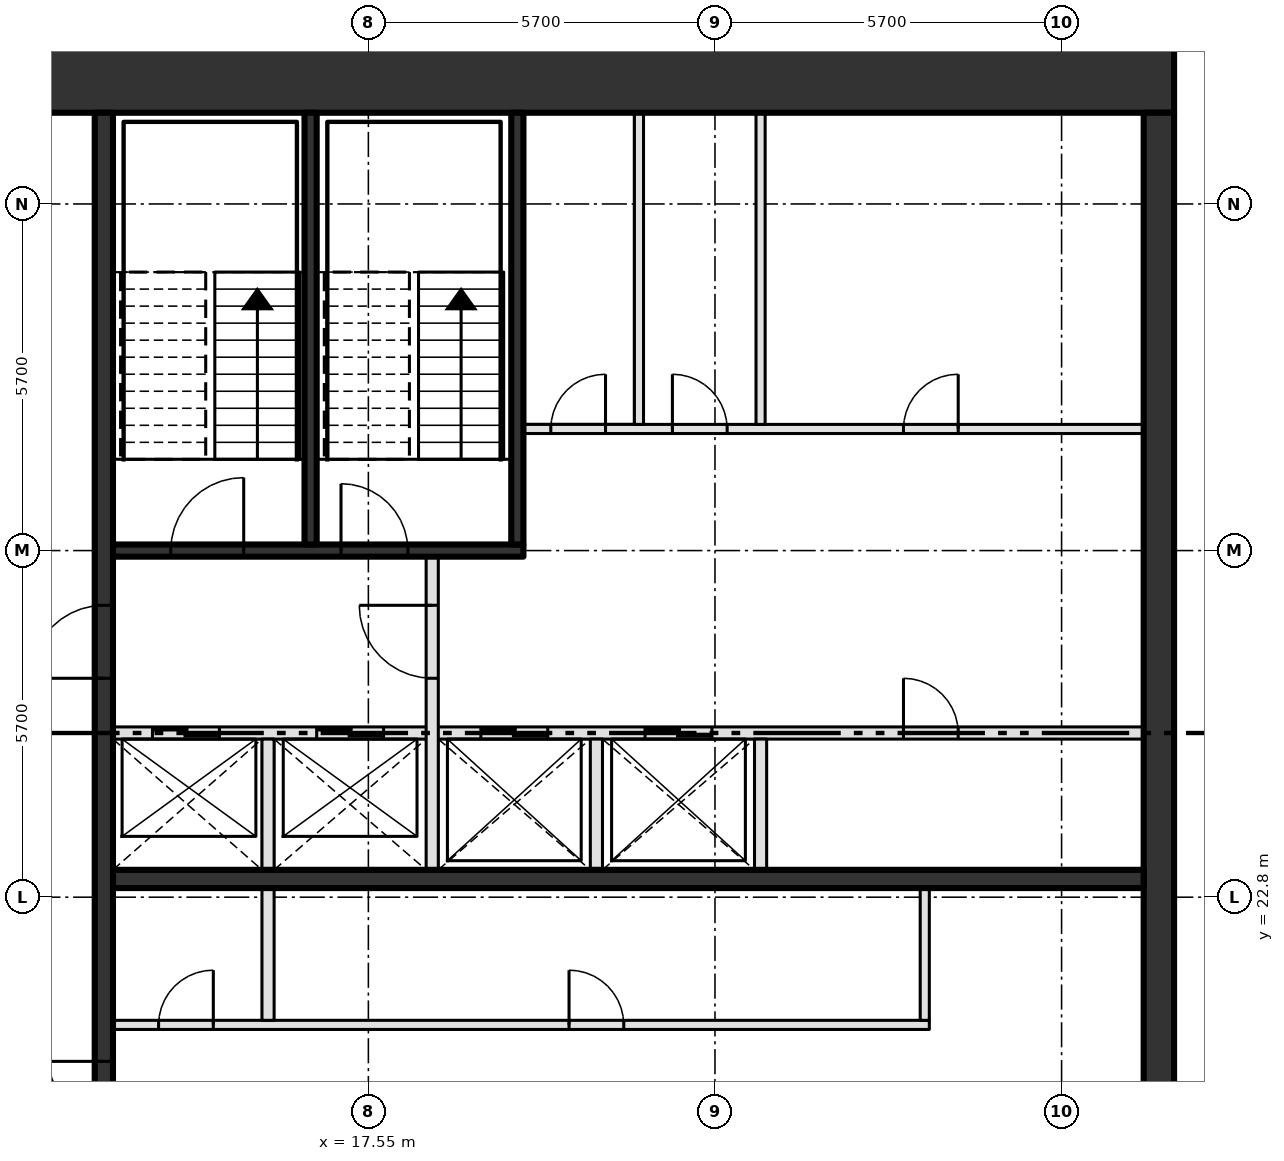
"""IFC4 building model, lengths in metres.
Left out: names, types, materials, properties, quantities, classifications, styles, units other than length and angle.
Written with IfcOpenShell. Run it as: python <this file> out.ifc"""

import sys

from ifc_helpers import new_model, si_unit, direction, frame, frame_2d, origin, place, context, subcontext, project, spatial, rectangle, extrude, element, fill, save


model = new_model("IFC4")
c1 = context("Model", 3, precision=1e-05, world=origin(), true_north=direction((0.0, 1.0)))
c2 = subcontext(c1, "Body", "Model", "MODEL_VIEW")
j1 = project(units=[si_unit("LENGTHUNIT", "METRE"), si_unit("PLANEANGLEUNIT", "RADIAN")], contexts=[c1])
p1 = place(None, origin())
s1 = spatial("IfcSite", under=j1, at=p1, CompositionType="ELEMENT")
p2 = place(p1, origin())
s2 = spatial("IfcBuilding", under=s1, at=p2, CompositionType="ELEMENT")
p3 = place(p2, frame((0.0, 0.0, 354.0)))
s3 = spatial("IfcBuildingStorey", under=s2, at=p3, CompositionType="ELEMENT", Elevation=354.0)
p4 = place(p3, frame((8.0, 36.3, -0.3), z_axis=(0.0, 0.0, 1.0), x_axis=(1.0, 0.0, 0.0)))
e1 = element("IfcWall", 1, at=p4, inside=s3, PredefinedType="SHEAR", context=c2, shape_type="SweptSolid", body=[
    extrude(rectangle(XDim=22.8, YDim=1.2, at=frame_2d((11.4, 0.0))), origin(), (0.0, 0.0, 1.0), 4.2),
])
p5 = place(p4, frame((2.3, 0.0, 0.3)))
e2 = element("IfcOpeningElement", 2, at=p5, cuts=e1, PredefinedType="OPENING", context=c2, shape_type="SweptSolid", body=[
    extrude(rectangle(XDim=1.8, YDim=2.1, at=frame_2d((0.9, 1.05))), frame((0.0, 0.61, 0.0), z_axis=(0.0, -1.0, 0.0), x_axis=(1.0, 0.0, 0.0)), (0.0, 0.0, 1.0), 1.22),
])
p6 = place(p3, frame((30.55, 14.6, -0.3), z_axis=(0.0, 0.0, 1.0), x_axis=(0.0, 1.0, 0.0)))
e3 = element("IfcWall", 3, at=p6, inside=s3, PredefinedType="SHEAR", context=c2, shape_type="SweptSolid", body=[
    extrude(rectangle(XDim=21.1, YDim=0.5, at=frame_2d((10.55, 0.0))), origin(), (0.0, 0.0, 1.0), 4.2),
])
p7 = place(p3, frame((13.35, 20.7, 0.0), z_axis=(0.0, 0.0, 1.0), x_axis=(1.0, 0.0, 0.0)))
e4 = element("IfcWall", 4, at=p7, inside=s3, PredefinedType="PARTITIONING", context=c2, shape_type="SweptSolid", body=[
    extrude(rectangle(XDim=13.425, YDim=0.15, at=frame_2d((6.712, 0.0))), origin(), (0.0, 0.0, 1.0), 3.9),
])
p8 = place(p7, frame((0.75, 0.0, 0.0)))
e5 = element("IfcOpeningElement", 5, at=p8, cuts=e4, PredefinedType="OPENING", context=c2, shape_type="SweptSolid", body=[
    extrude(rectangle(XDim=0.9, YDim=2.1, at=frame_2d((0.45, 1.05))), frame((0.0, 0.085, 0.0), z_axis=(0.0, -1.0, 0.0), x_axis=(1.0, 0.0, 0.0)), (0.0, 0.0, 1.0), 0.17),
])
p9 = place(p7, frame((7.5, 0.0, 0.0)))
e6 = element("IfcOpeningElement", 6, at=p9, cuts=e4, PredefinedType="OPENING", context=c2, shape_type="SweptSolid", body=[
    extrude(rectangle(XDim=0.9, YDim=2.1, at=frame_2d((0.45, 1.05))), frame((0.0, 0.085, 0.0), z_axis=(0.0, -1.0, 0.0), x_axis=(1.0, 0.0, 0.0)), (0.0, 0.0, 1.0), 0.17),
])
p10 = place(p3, frame((13.35, 23.1, 0.0), z_axis=(0.0, 0.0, 1.0), x_axis=(1.0, 0.0, 0.0)))
e7 = element("IfcWall", 7, at=p10, inside=s3, PredefinedType="SHEAR", context=c2, shape_type="SweptSolid", body=[
    extrude(rectangle(XDim=16.95, YDim=0.3, at=frame_2d((8.475, 0.0))), origin(), (0.0, 0.0, 1.0), 3.9),
])
p11 = place(p3, frame((13.35, 25.5, 0.0), z_axis=(0.0, 0.0, 1.0), x_axis=(1.0, 0.0, 0.0)))
e8 = element("IfcWall", 8, at=p11, inside=s3, PredefinedType="SOLIDWALL", context=c2, shape_type="SweptSolid", body=[
    extrude(rectangle(XDim=16.95, YDim=0.2, at=frame_2d((8.475, 0.0))), origin(), (0.0, 0.0, 1.0), 3.9),
])
p12 = place(p11, frame((0.65, 0.0, 0.0)))
e9 = element("IfcOpeningElement", 9, at=p12, cuts=e8, PredefinedType="OPENING", context=c2, shape_type="SweptSolid", body=[
    extrude(rectangle(XDim=1.1, YDim=2.1, at=frame_2d((0.55, 1.05))), frame((0.0, 0.11, 0.0), z_axis=(0.0, -1.0, 0.0), x_axis=(1.0, 0.0, 0.0)), (0.0, 0.0, 1.0), 0.22),
])
p13 = place(p11, frame((3.35, 0.0, 0.0)))
e10 = element("IfcOpeningElement", 10, at=p13, cuts=e8, PredefinedType="OPENING", context=c2, shape_type="SweptSolid", body=[
    extrude(rectangle(XDim=1.1, YDim=2.1, at=frame_2d((0.55, 1.05))), frame((0.0, 0.11, 0.0), z_axis=(0.0, -1.0, 0.0), x_axis=(1.0, 0.0, 0.0)), (0.0, 0.0, 1.0), 0.22),
])
p14 = place(p11, frame((6.05, 0.0, 0.0)))
e11 = element("IfcOpeningElement", 11, at=p14, cuts=e8, PredefinedType="OPENING", context=c2, shape_type="SweptSolid", body=[
    extrude(rectangle(XDim=1.1, YDim=2.1, at=frame_2d((0.55, 1.05))), frame((0.0, 0.11, 0.0), z_axis=(0.0, -1.0, 0.0), x_axis=(1.0, 0.0, 0.0)), (0.0, 0.0, 1.0), 0.22),
])
p15 = place(p11, frame((8.75, 0.0, 0.0)))
e12 = element("IfcOpeningElement", 12, at=p15, cuts=e8, PredefinedType="OPENING", context=c2, shape_type="SweptSolid", body=[
    extrude(rectangle(XDim=1.1, YDim=2.1, at=frame_2d((0.55, 1.05))), frame((0.0, 0.11, 0.0), z_axis=(0.0, -1.0, 0.0), x_axis=(1.0, 0.0, 0.0)), (0.0, 0.0, 1.0), 0.22),
])
p16 = place(p11, frame((13.0, 0.0, 0.0)))
e13 = element("IfcOpeningElement", 13, at=p16, cuts=e8, PredefinedType="OPENING", context=c2, shape_type="SweptSolid", body=[
    extrude(rectangle(XDim=0.9, YDim=2.1, at=frame_2d((0.45, 1.05))), frame((0.0, 0.11, 0.0), z_axis=(0.0, -1.0, 0.0), x_axis=(1.0, 0.0, 0.0)), (0.0, 0.0, 1.0), 0.22),
])
p17 = place(p3, frame((13.35, 28.5, 0.0), z_axis=(0.0, 0.0, 1.0), x_axis=(1.0, 0.0, 0.0)))
e14 = element("IfcWall", 14, at=p17, inside=s3, PredefinedType="SOLIDWALL", context=c2, shape_type="SweptSolid", body=[
    extrude(rectangle(XDim=6.75, YDim=0.2, at=frame_2d((3.375, 0.0))), origin(), (0.0, 0.0, 1.0), 3.9),
])
p18 = place(p17, frame((0.95, 0.0, 0.0)))
e15 = element("IfcOpeningElement", 15, at=p18, cuts=e14, PredefinedType="OPENING", context=c2, shape_type="SweptSolid", body=[
    extrude(rectangle(XDim=1.2, YDim=2.1, at=frame_2d((0.6, 1.05))), frame((0.0, 0.11, 0.0), z_axis=(0.0, -1.0, 0.0), x_axis=(1.0, 0.0, 0.0)), (0.0, 0.0, 1.0), 0.22),
])
p19 = place(p17, frame((3.75, 0.0, 0.0)))
e16 = element("IfcOpeningElement", 16, at=p19, cuts=e14, PredefinedType="OPENING", context=c2, shape_type="SweptSolid", body=[
    extrude(rectangle(XDim=1.1, YDim=2.1, at=frame_2d((0.55, 1.05))), frame((0.0, 0.11, 0.0), z_axis=(0.0, -1.0, 0.0), x_axis=(1.0, 0.0, 0.0)), (0.0, 0.0, 1.0), 0.22),
])
p20 = place(p3, frame((20.1, 30.5, 0.0), z_axis=(0.0, 0.0, 1.0), x_axis=(1.0, 0.0, 0.0)))
e17 = element("IfcWall", 17, at=p20, inside=s3, PredefinedType="PARTITIONING", context=c2, shape_type="SweptSolid", body=[
    extrude(rectangle(XDim=10.2, YDim=0.15, at=frame_2d((5.1, 0.0))), origin(), (0.0, 0.0, 1.0), 3.9),
])
p21 = place(p20, frame((0.45, 0.0, 0.0)))
e18 = element("IfcOpeningElement", 18, at=p21, cuts=e17, PredefinedType="OPENING", context=c2, shape_type="SweptSolid", body=[
    extrude(rectangle(XDim=0.9, YDim=2.1, at=frame_2d((0.45, 1.05))), frame((0.0, 0.085, 0.0), z_axis=(0.0, -1.0, 0.0), x_axis=(1.0, 0.0, 0.0)), (0.0, 0.0, 1.0), 0.17),
])
p22 = place(p20, frame((2.45, 0.0, 0.0)))
e19 = element("IfcOpeningElement", 19, at=p22, cuts=e17, PredefinedType="OPENING", context=c2, shape_type="SweptSolid", body=[
    extrude(rectangle(XDim=0.9, YDim=2.1, at=frame_2d((0.45, 1.05))), frame((0.0, 0.085, 0.0), z_axis=(0.0, -1.0, 0.0), x_axis=(1.0, 0.0, 0.0)), (0.0, 0.0, 1.0), 0.17),
])
p23 = place(p20, frame((6.25, 0.0, 0.0)))
e20 = element("IfcOpeningElement", 20, at=p23, cuts=e17, PredefinedType="OPENING", context=c2, shape_type="SweptSolid", body=[
    extrude(rectangle(XDim=0.9, YDim=2.1, at=frame_2d((0.45, 1.05))), frame((0.0, 0.085, 0.0), z_axis=(0.0, -1.0, 0.0), x_axis=(1.0, 0.0, 0.0)), (0.0, 0.0, 1.0), 0.17),
])
p24 = place(p3, frame((13.2, 14.6, 0.0), z_axis=(0.0, 0.0, 1.0), x_axis=(0.0, 1.0, 0.0)))
e21 = element("IfcWall", 21, at=p24, inside=s3, PredefinedType="SHEAR", context=c2, shape_type="SweptSolid", body=[
    extrude(rectangle(XDim=21.1, YDim=0.3, at=frame_2d((10.55, 0.0))), origin(), (0.0, 0.0, 1.0), 3.9),
])
p25 = place(p24, frame((3.7, 0.0, 0.0)))
e22 = element("IfcOpeningElement", 22, at=p25, cuts=e21, PredefinedType="OPENING", context=c2, shape_type="SweptSolid", body=[
    extrude(rectangle(XDim=1.8, YDim=2.1, at=frame_2d((0.9, 1.05))), frame((0.0, 0.16, 0.0), z_axis=(0.0, -1.0, 0.0), x_axis=(1.0, 0.0, 0.0)), (0.0, 0.0, 1.0), 0.32),
])
p26 = place(p24, frame((11.8, 0.0, 0.0)))
e23 = element("IfcOpeningElement", 23, at=p26, cuts=e21, PredefinedType="OPENING", context=c2, shape_type="SweptSolid", body=[
    extrude(rectangle(XDim=1.2, YDim=2.1, at=frame_2d((0.6, 1.05))), frame((0.0, 0.16, 0.0), z_axis=(0.0, -1.0, 0.0), x_axis=(1.0, 0.0, 0.0)), (0.0, 0.0, 1.0), 0.32),
])
p27 = place(p3, frame((15.9, 20.775, 0.0), z_axis=(0.0, 0.0, 1.0), x_axis=(0.0, 1.0, 0.0)))
e24 = element("IfcWall", 24, at=p27, inside=s3, PredefinedType="SOLIDWALL", context=c2, shape_type="SweptSolid", body=[
    extrude(rectangle(XDim=4.625, YDim=0.2, at=frame_2d((2.312, 0.0))), origin(), (0.0, 0.0, 1.0), 3.9),
])
p28 = place(p3, frame((16.6, 28.6, 0.0), z_axis=(0.0, 0.0, 1.0), x_axis=(0.0, 1.0, 0.0)))
e25 = element("IfcWall", 25, at=p28, inside=s3, PredefinedType="SOLIDWALL", context=c2, shape_type="SweptSolid", body=[
    extrude(rectangle(XDim=7.1, YDim=0.2, at=frame_2d((3.55, 0.0))), origin(), (0.0, 0.0, 1.0), 3.9),
])
p29 = place(p3, frame((18.6, 23.25, 0.0), z_axis=(0.0, 0.0, 1.0), x_axis=(0.0, 1.0, 0.0)))
e26 = element("IfcWall", 26, at=p29, inside=s3, PredefinedType="SOLIDWALL", context=c2, shape_type="SweptSolid", body=[
    extrude(rectangle(XDim=5.15, YDim=0.2, at=frame_2d((2.575, 0.0))), origin(), (0.0, 0.0, 1.0), 3.9),
])
p30 = place(p29, frame((3.15, 0.0, 0.0)))
e27 = element("IfcOpeningElement", 27, at=p30, cuts=e26, PredefinedType="OPENING", context=c2, shape_type="SweptSolid", body=[
    extrude(rectangle(XDim=1.2, YDim=2.1, at=frame_2d((0.6, 1.05))), frame((0.0, 0.11, 0.0), z_axis=(0.0, -1.0, 0.0), x_axis=(1.0, 0.0, 0.0)), (0.0, 0.0, 1.0), 0.22),
])
p31 = place(p3, frame((20.0, 28.6, 0.0), z_axis=(0.0, 0.0, 1.0), x_axis=(0.0, 1.0, 0.0)))
e28 = element("IfcWall", 28, at=p31, inside=s3, PredefinedType="SOLIDWALL", context=c2, shape_type="SweptSolid", body=[
    extrude(rectangle(XDim=7.1, YDim=0.2, at=frame_2d((3.55, 0.0))), origin(), (0.0, 0.0, 1.0), 3.9),
])
p32 = place(p3, frame((21.3, 23.25, 0.0), z_axis=(0.0, 0.0, 1.0), x_axis=(0.0, 1.0, 0.0)))
e29 = element("IfcWall", 29, at=p32, inside=s3, PredefinedType="SOLIDWALL", context=c2, shape_type="SweptSolid", body=[
    extrude(rectangle(XDim=2.15, YDim=0.2, at=frame_2d((1.075, 0.0))), origin(), (0.0, 0.0, 1.0), 3.9),
])
p33 = place(p3, frame((22.0, 30.575, 0.0), z_axis=(0.0, 0.0, 1.0), x_axis=(0.0, 1.0, 0.0)))
e30 = element("IfcWall", 30, at=p33, inside=s3, PredefinedType="PARTITIONING", context=c2, shape_type="SweptSolid", body=[
    extrude(rectangle(XDim=5.125, YDim=0.15, at=frame_2d((2.562, 0.0))), origin(), (0.0, 0.0, 1.0), 3.9),
])
p34 = place(p3, frame((24.0, 23.25, 0.0), z_axis=(0.0, 0.0, 1.0), x_axis=(0.0, 1.0, 0.0)))
e31 = element("IfcWall", 31, at=p34, inside=s3, PredefinedType="SOLIDWALL", context=c2, shape_type="SweptSolid", body=[
    extrude(rectangle(XDim=2.15, YDim=0.2, at=frame_2d((1.075, 0.0))), origin(), (0.0, 0.0, 1.0), 3.9),
])
p35 = place(p3, frame((24.0, 30.575, 0.0), z_axis=(0.0, 0.0, 1.0), x_axis=(0.0, 1.0, 0.0)))
e32 = element("IfcWall", 32, at=p35, inside=s3, PredefinedType="PARTITIONING", context=c2, shape_type="SweptSolid", body=[
    extrude(rectangle(XDim=5.125, YDim=0.15, at=frame_2d((2.562, 0.0))), origin(), (0.0, 0.0, 1.0), 3.9),
])
p36 = place(p3, frame((26.7, 20.775, 0.0), z_axis=(0.0, 0.0, 1.0), x_axis=(0.0, 1.0, 0.0)))
e33 = element("IfcWall", 33, at=p36, inside=s3, PredefinedType="PARTITIONING", context=c2, shape_type="SweptSolid", body=[
    extrude(rectangle(XDim=2.175, YDim=0.15, at=frame_2d((1.087, 0.0))), origin(), (0.0, 0.0, 1.0), 3.9),
])
p37 = place(p12, origin())
e34 = element("IfcDoor", 34, at=p37, inside=s3, OperationType="SLIDING_TO_LEFT", PredefinedType="DOOR", context=c2, shape_type="SweptSolid", body=[
    extrude(rectangle(XDim=1.1, YDim=2.1, at=frame_2d((0.55, 1.05))), frame((0.0, 0.025, 0.0), z_axis=(0.0, -1.0, 0.0), x_axis=(1.0, 0.0, 0.0)), (0.0, 0.0, 1.0), 0.05),
])
fill(e9, e34)
p38 = place(p13, origin())
e35 = element("IfcDoor", 35, at=p38, inside=s3, OperationType="SLIDING_TO_LEFT", PredefinedType="DOOR", context=c2, shape_type="SweptSolid", body=[
    extrude(rectangle(XDim=1.1, YDim=2.1, at=frame_2d((0.55, 1.05))), frame((0.0, 0.025, 0.0), z_axis=(0.0, -1.0, 0.0), x_axis=(1.0, 0.0, 0.0)), (0.0, 0.0, 1.0), 0.05),
])
fill(e10, e35)
p39 = place(p14, origin())
e36 = element("IfcDoor", 36, at=p39, inside=s3, OperationType="SLIDING_TO_LEFT", PredefinedType="DOOR", context=c2, shape_type="SweptSolid", body=[
    extrude(rectangle(XDim=1.1, YDim=2.1, at=frame_2d((0.55, 1.05))), frame((0.0, 0.025, 0.0), z_axis=(0.0, -1.0, 0.0), x_axis=(1.0, 0.0, 0.0)), (0.0, 0.0, 1.0), 0.05),
])
fill(e11, e36)
p40 = place(p15, origin())
e37 = element("IfcDoor", 37, at=p40, inside=s3, OperationType="SLIDING_TO_LEFT", PredefinedType="DOOR", context=c2, shape_type="SweptSolid", body=[
    extrude(rectangle(XDim=1.1, YDim=2.1, at=frame_2d((0.55, 1.05))), frame((0.0, 0.025, 0.0), z_axis=(0.0, -1.0, 0.0), x_axis=(1.0, 0.0, 0.0)), (0.0, 0.0, 1.0), 0.05),
])
fill(e12, e37)
p41 = place(p8, origin())
e38 = element("IfcDoor", 38, at=p41, inside=s3, OperationType="SINGLE_SWING_RIGHT", PredefinedType="DOOR", context=c2, shape_type="SweptSolid", body=[
    extrude(rectangle(XDim=0.9, YDim=2.1, at=frame_2d((0.45, 1.05))), frame((0.0, 0.025, 0.0), z_axis=(0.0, -1.0, 0.0), x_axis=(1.0, 0.0, 0.0)), (0.0, 0.0, 1.0), 0.05),
])
fill(e5, e38)
p42 = place(p9, origin())
e39 = element("IfcDoor", 39, at=p42, inside=s3, OperationType="SINGLE_SWING_LEFT", PredefinedType="DOOR", context=c2, shape_type="SweptSolid", body=[
    extrude(rectangle(XDim=0.9, YDim=2.1, at=frame_2d((0.45, 1.05))), frame((0.0, 0.025, 0.0), z_axis=(0.0, -1.0, 0.0), x_axis=(1.0, 0.0, 0.0)), (0.0, 0.0, 1.0), 0.05),
])
fill(e6, e39)
p43 = place(p16, origin())
e40 = element("IfcDoor", 40, at=p43, inside=s3, OperationType="SINGLE_SWING_LEFT", PredefinedType="DOOR", context=c2, shape_type="SweptSolid", body=[
    extrude(rectangle(XDim=0.9, YDim=2.1, at=frame_2d((0.45, 1.05))), frame((0.0, 0.025, 0.0), z_axis=(0.0, -1.0, 0.0), x_axis=(1.0, 0.0, 0.0)), (0.0, 0.0, 1.0), 0.05),
])
fill(e13, e40)
p44 = place(p21, origin())
e41 = element("IfcDoor", 41, at=p44, inside=s3, OperationType="SINGLE_SWING_RIGHT", PredefinedType="DOOR", context=c2, shape_type="SweptSolid", body=[
    extrude(rectangle(XDim=0.9, YDim=2.1, at=frame_2d((0.45, 1.05))), frame((0.0, 0.025, 0.0), z_axis=(0.0, -1.0, 0.0), x_axis=(1.0, 0.0, 0.0)), (0.0, 0.0, 1.0), 0.05),
])
fill(e18, e41)
p45 = place(p22, origin())
e42 = element("IfcDoor", 42, at=p45, inside=s3, OperationType="SINGLE_SWING_LEFT", PredefinedType="DOOR", context=c2, shape_type="SweptSolid", body=[
    extrude(rectangle(XDim=0.9, YDim=2.1, at=frame_2d((0.45, 1.05))), frame((0.0, 0.025, 0.0), z_axis=(0.0, -1.0, 0.0), x_axis=(1.0, 0.0, 0.0)), (0.0, 0.0, 1.0), 0.05),
])
fill(e19, e42)
p46 = place(p23, origin())
e43 = element("IfcDoor", 43, at=p46, inside=s3, OperationType="SINGLE_SWING_RIGHT", PredefinedType="DOOR", context=c2, shape_type="SweptSolid", body=[
    extrude(rectangle(XDim=0.9, YDim=2.1, at=frame_2d((0.45, 1.05))), frame((0.0, 0.025, 0.0), z_axis=(0.0, -1.0, 0.0), x_axis=(1.0, 0.0, 0.0)), (0.0, 0.0, 1.0), 0.05),
])
fill(e20, e43)
p47 = place(p18, origin())
e44 = element("IfcDoor", 44, at=p47, inside=s3, OperationType="SINGLE_SWING_RIGHT", PredefinedType="DOOR", context=c2, shape_type="SweptSolid", body=[
    extrude(rectangle(XDim=1.2, YDim=2.1, at=frame_2d((0.6, 1.05))), frame((0.0, 0.025, 0.0), z_axis=(0.0, -1.0, 0.0), x_axis=(1.0, 0.0, 0.0)), (0.0, 0.0, 1.0), 0.05),
])
fill(e15, e44)
p48 = place(p19, origin())
e45 = element("IfcDoor", 45, at=p48, inside=s3, OperationType="SINGLE_SWING_LEFT", PredefinedType="DOOR", context=c2, shape_type="SweptSolid", body=[
    extrude(rectangle(XDim=1.1, YDim=2.1, at=frame_2d((0.55, 1.05))), frame((0.0, 0.025, 0.0), z_axis=(0.0, -1.0, 0.0), x_axis=(1.0, 0.0, 0.0)), (0.0, 0.0, 1.0), 0.05),
])
fill(e16, e45)
p49 = place(p25, origin())
e46 = element("IfcDoor", 46, at=p49, inside=s3, OperationType="DOUBLE_DOOR_SINGLE_SWING", PredefinedType="DOOR", context=c2, shape_type="SweptSolid", body=[
    extrude(rectangle(XDim=1.8, YDim=2.1, at=frame_2d((0.9, 1.05))), frame((0.0, 0.025, 0.0), z_axis=(0.0, -1.0, 0.0), x_axis=(1.0, 0.0, 0.0)), (0.0, 0.0, 1.0), 0.05),
])
fill(e22, e46)
p50 = place(p26, origin())
e47 = element("IfcDoor", 47, at=p50, inside=s3, OperationType="SINGLE_SWING_LEFT", PredefinedType="DOOR", context=c2, shape_type="SweptSolid", body=[
    extrude(rectangle(XDim=1.2, YDim=2.1, at=frame_2d((0.6, 1.05))), frame((0.0, 0.025, 0.0), z_axis=(0.0, -1.0, 0.0), x_axis=(1.0, 0.0, 0.0)), (0.0, 0.0, 1.0), 0.05),
])
fill(e23, e47)
p51 = place(p30, origin())
e48 = element("IfcDoor", 48, at=p51, inside=s3, OperationType="SINGLE_SWING_RIGHT", PredefinedType="DOOR", context=c2, shape_type="SweptSolid", body=[
    extrude(rectangle(XDim=1.2, YDim=2.1, at=frame_2d((0.6, 1.05))), frame((0.0, 0.025, 0.0), z_axis=(0.0, -1.0, 0.0), x_axis=(1.0, 0.0, 0.0)), (0.0, 0.0, 1.0), 0.05),
])
fill(e27, e48)
save(model, sys.argv[1])
